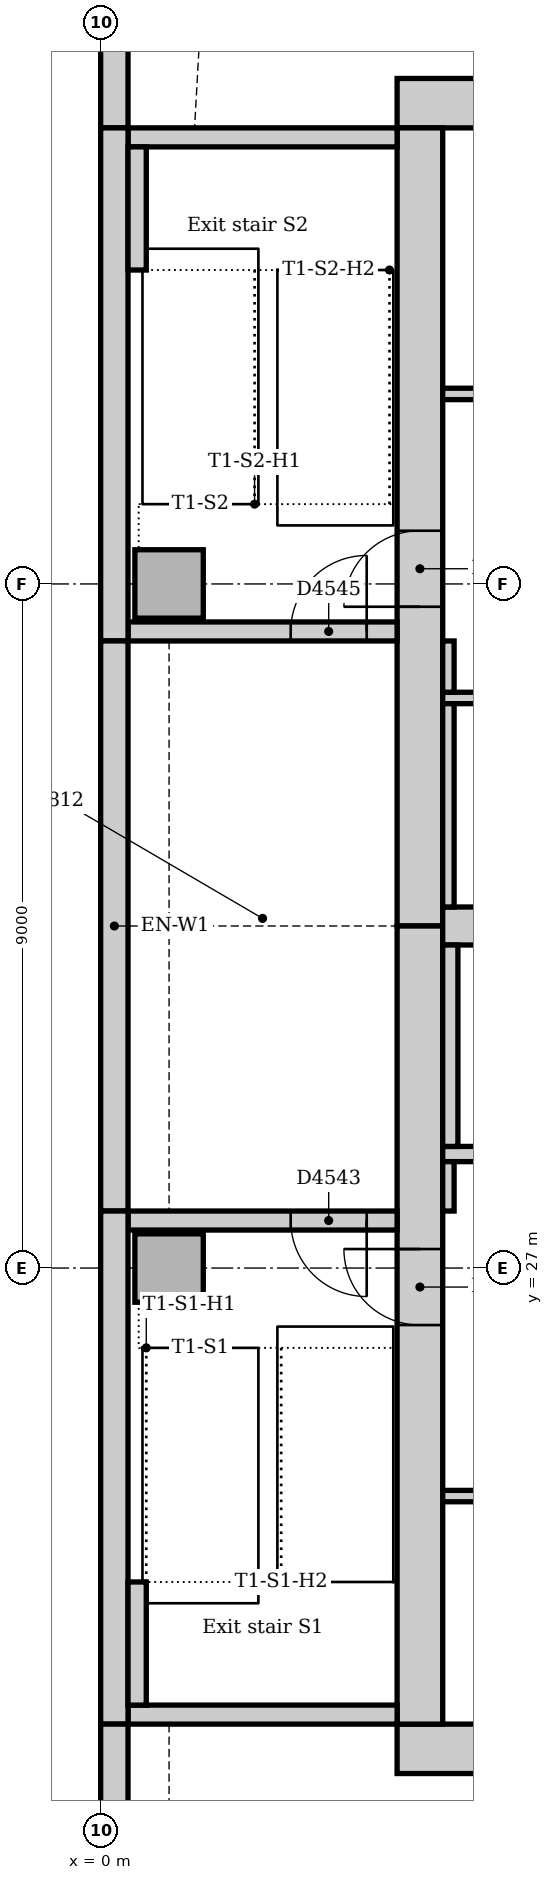
"""IFC4 building model, lengths in metres.
Left out: names, types, materials, properties, quantities, classifications, styles, units other than length and angle.
Written with IfcOpenShell. Run it as: python <this file> out.ifc"""

import sys

from ifc_helpers import new_model, si_unit, direction, frame, frame_2d, origin, origin_2d, place, context, subcontext, project, spatial, rectangle, extrude, element, fill, save


model = new_model("IFC4")
c1 = context("Model", 3, precision=1e-05, world=origin(), true_north=direction((0.0, 1.0)))
c2 = subcontext(c1, "Body", "Model", "MODEL_VIEW")
j1 = project(units=[si_unit("LENGTHUNIT", "METRE"), si_unit("PLANEANGLEUNIT", "RADIAN")], contexts=[c1])
p1 = place(None, origin())
s1 = spatial("IfcSite", under=j1, at=p1, CompositionType="ELEMENT")
p2 = place(p1, origin())
s2 = spatial("IfcBuilding", under=s1, at=p2, CompositionType="ELEMENT")
p3 = place(p2, frame((0.0, 0.0, 161.0)))
s3 = spatial("IfcBuildingStorey", under=s2, at=p3, CompositionType="ELEMENT", Elevation=161.0)
for number, where, z_axis, x_axis in (
    (1, (3.9, 20.675, 0.0), (0.0, 0.0, 1.0), (1.0, 0.0, 0.0)),
    (2, (23.15, 42.325, 0.0), (0.0, 0.0, 1.0), (-1.0, 0.0, 0.0)),
):
    element("IfcWall", number, at=place(p3, frame(where, z_axis=z_axis, x_axis=x_axis)), inside=s3, PredefinedType="SOLIDWALL", context=c2, shape_type="SweptSolid", body=[
        extrude(rectangle(XDim=19.25, YDim=0.65, at=frame_2d((9.625, 0.0))), origin(), (0.0, 0.0, 1.0), 4.0),
    ])
p4 = place(p3, frame((4.2, 42.0, 0.0), z_axis=(0.0, 0.0, 1.0), x_axis=(0.0, -1.0, 0.0)))
e3 = element("IfcWall", 3, at=p4, inside=s3, PredefinedType="SOLIDWALL", context=c2, shape_type="SweptSolid", body=[
    extrude(rectangle(XDim=10.5, YDim=0.6, at=frame_2d((5.25, 0.0))), origin(), (0.0, 0.0, 1.0), 4.0),
])
p5 = place(p4, frame((5.3, 0.0, 0.0)))
e4 = element("IfcOpeningElement", 4, at=p5, cuts=e3, PredefinedType="OPENING", context=c2, shape_type="SweptSolid", body=[
    extrude(rectangle(XDim=1.0, YDim=2.1, at=frame_2d((0.5, 1.05))), frame((0.0, 0.31, 0.0), z_axis=(0.0, -1.0, 0.0), x_axis=(1.0, 0.0, 0.0)), (0.0, 0.0, 1.0), 0.62),
])
p6 = place(p3, frame((4.2, 31.5, 0.0), z_axis=(0.0, 0.0, 1.0), x_axis=(0.0, -1.0, 0.0)))
e5 = element("IfcWall", 5, at=p6, inside=s3, PredefinedType="SOLIDWALL", context=c2, shape_type="SweptSolid", body=[
    extrude(rectangle(XDim=10.5, YDim=0.6, at=frame_2d((5.25, 0.0))), origin(), (0.0, 0.0, 1.0), 4.0),
])
p7 = place(p6, frame((4.25, 0.0, 0.0)))
e6 = element("IfcOpeningElement", 6, at=p7, cuts=e5, PredefinedType="OPENING", context=c2, shape_type="SweptSolid", body=[
    extrude(rectangle(XDim=1.0, YDim=2.1, at=frame_2d((0.5, 1.05))), frame((0.0, 0.31, 0.0), z_axis=(0.0, -1.0, 0.0), x_axis=(1.0, 0.0, 0.0)), (0.0, 0.0, 1.0), 0.62),
])
p8 = place(p3, frame((4.5, 31.5, 0.0), z_axis=(0.0, 0.0, 1.0), x_axis=(1.0, 0.0, 0.0)))
e7 = element("IfcWall", 7, at=p8, inside=s3, PredefinedType="SOLIDWALL", context=c2, shape_type="SweptSolid", body=[
    extrude(rectangle(XDim=18.0, YDim=0.5, at=frame_2d((9.0, 0.0))), origin(), (0.0, 0.0, 1.0), 4.0),
])
p9 = place(p3, frame((0.36, 21.125, 0.0), z_axis=(0.0, 0.0, 1.0), x_axis=(1.0, 0.0, 0.0)))
e8 = element("IfcWall", 8, at=p9, inside=s3, PredefinedType="SOLIDWALL", context=c2, shape_type="SweptSolid", body=[
    extrude(rectangle(XDim=3.54, YDim=0.25, at=frame_2d((1.77, 0.0))), origin(), (0.0, 0.0, 1.0), 4.0),
])
p10 = place(p3, frame((3.9, 27.625, 0.0), z_axis=(0.0, 0.0, 1.0), x_axis=(-1.0, 0.0, 0.0)))
e9 = element("IfcWall", 9, at=p10, inside=s3, PredefinedType="SOLIDWALL", context=c2, shape_type="SweptSolid", body=[
    extrude(rectangle(XDim=3.54, YDim=0.25, at=frame_2d((1.77, 0.0))), origin(), (0.0, 0.0, 1.0), 4.0),
])
p11 = place(p10, frame((0.4, 0.0, 0.0)))
e10 = element("IfcOpeningElement", 10, at=p11, cuts=e9, PredefinedType="OPENING", context=c2, shape_type="SweptSolid", body=[
    extrude(rectangle(XDim=1.0, YDim=2.1, at=frame_2d((0.5, 1.05))), frame((0.0, 0.135, 0.0), z_axis=(0.0, -1.0, 0.0), x_axis=(1.0, 0.0, 0.0)), (0.0, 0.0, 1.0), 0.27),
])
p12 = place(p3, frame((0.36, 35.375, 0.0), z_axis=(0.0, 0.0, 1.0), x_axis=(1.0, 0.0, 0.0)))
e11 = element("IfcWall", 11, at=p12, inside=s3, PredefinedType="SOLIDWALL", context=c2, shape_type="SweptSolid", body=[
    extrude(rectangle(XDim=3.54, YDim=0.25, at=frame_2d((1.77, 0.0))), origin(), (0.0, 0.0, 1.0), 4.0),
])
p13 = place(p12, frame((2.14, 0.0, 0.0)))
e12 = element("IfcOpeningElement", 12, at=p13, cuts=e11, PredefinedType="OPENING", context=c2, shape_type="SweptSolid", body=[
    extrude(rectangle(XDim=1.0, YDim=2.1, at=frame_2d((0.5, 1.05))), frame((0.0, 0.135, 0.0), z_axis=(0.0, -1.0, 0.0), x_axis=(1.0, 0.0, 0.0)), (0.0, 0.0, 1.0), 0.27),
])
p14 = place(p3, frame((3.9, 41.875, 0.0), z_axis=(0.0, 0.0, 1.0), x_axis=(-1.0, 0.0, 0.0)))
e13 = element("IfcWall", 13, at=p14, inside=s3, PredefinedType="SOLIDWALL", context=c2, shape_type="SweptSolid", body=[
    extrude(rectangle(XDim=3.54, YDim=0.25, at=frame_2d((1.77, 0.0))), origin(), (0.0, 0.0, 1.0), 4.0),
])
for number, where, z_axis, x_axis in (
    (14, (0.9, 27.0, 0.0), (0.0, 0.0, 1.0), (1.0, 0.0, 0.0)),
    (15, (0.9, 36.0, 0.0), (0.0, 0.0, 1.0), (1.0, 0.0, 0.0)),
):
    element("IfcColumn", number, at=place(p3, frame(where, z_axis=z_axis, x_axis=x_axis)), inside=s3, PredefinedType="COLUMN", context=c2, shape_type="SweptSolid", body=[
        extrude(rectangle(XDim=0.9, YDim=0.9, at=origin_2d()), origin(), (0.0, 0.0, 1.0), 4.0),
    ])
p15 = place(p3, frame((0.18, 49.757, 0.0), z_axis=(0.0, 0.0, 1.0), x_axis=(0.0, -1.0, 0.0)))
e16 = element("IfcWall", 16, at=p15, inside=s3, PredefinedType="STANDARD", context=c2, shape_type="SweptSolid", body=[
    extrude(rectangle(XDim=7.757, YDim=0.36, at=frame_2d((3.879, 0.0))), origin(), (0.0, 0.0, 1.0), 3.85),
])
p16 = place(p15, frame((3.107, 0.0, 0.9)))
e17 = element("IfcOpeningElement", 17, at=p16, cuts=e16, PredefinedType="OPENING", context=c2, shape_type="SweptSolid", body=[
    extrude(rectangle(XDim=3.3, YDim=1.6, at=frame_2d((1.65, 0.8))), frame((0.0, 0.19, 0.0), z_axis=(0.0, -1.0, 0.0), x_axis=(1.0, 0.0, 0.0)), (0.0, 0.0, 1.0), 0.38),
])
p17 = place(p3, frame((0.18, 42.0, 0.0), z_axis=(0.0, 0.0, 1.0), x_axis=(0.0, -1.0, 0.0)))
e18 = element("IfcWall", 18, at=p17, inside=s3, PredefinedType="STANDARD", context=c2, shape_type="SweptSolid", body=[
    extrude(rectangle(XDim=6.75, YDim=0.36, at=frame_2d((3.375, 0.0))), origin(), (0.0, 0.0, 1.0), 3.85),
])
p18 = place(p3, frame((0.18, 35.25, 0.0), z_axis=(0.0, 0.0, 1.0), x_axis=(0.0, -1.0, 0.0)))
e19 = element("IfcWall", 19, at=p18, inside=s3, PredefinedType="STANDARD", context=c2, shape_type="SweptSolid", body=[
    extrude(rectangle(XDim=7.5, YDim=0.36, at=frame_2d((3.75, 0.0))), origin(), (0.0, 0.0, 1.0), 3.85),
])
p19 = place(p3, frame((0.18, 27.75, 0.0), z_axis=(0.0, 0.0, 1.0), x_axis=(0.0, -1.0, 0.0)))
e20 = element("IfcWall", 20, at=p19, inside=s3, PredefinedType="STANDARD", context=c2, shape_type="SweptSolid", body=[
    extrude(rectangle(XDim=6.75, YDim=0.36, at=frame_2d((3.375, 0.0))), origin(), (0.0, 0.0, 1.0), 3.85),
])
p20 = place(p3, frame((0.18, 21.0, 0.0), z_axis=(0.0, 0.0, 1.0), x_axis=(0.0, -1.0, 0.0)))
e21 = element("IfcWall", 21, at=p20, inside=s3, PredefinedType="STANDARD", context=c2, shape_type="SweptSolid", body=[
    extrude(rectangle(XDim=7.757, YDim=0.36, at=frame_2d((3.879, 0.0))), origin(), (0.0, 0.0, 1.0), 3.85),
])
p21 = place(p20, frame((1.35, 0.0, 0.9)))
e22 = element("IfcOpeningElement", 22, at=p21, cuts=e21, PredefinedType="OPENING", context=c2, shape_type="SweptSolid", body=[
    extrude(rectangle(XDim=3.3, YDim=1.6, at=frame_2d((1.65, 0.8))), frame((0.0, 0.19, 0.0), z_axis=(0.0, -1.0, 0.0), x_axis=(1.0, 0.0, 0.0)), (0.0, 0.0, 1.0), 0.38),
])
for number, where, z_axis, x_axis in (
    (23, (0.48, 21.25, 0.0), (0.0, 0.0, 1.0), (0.0, 1.0, 0.0)),
    (24, (0.48, 40.13, 0.0), (0.0, 0.0, 1.0), (0.0, 1.0, 0.0)),
):
    element("IfcWall", number, at=place(p3, frame(where, z_axis=z_axis, x_axis=x_axis)), inside=s3, PredefinedType="STANDARD", context=c2, shape_type="SweptSolid", body=[
        extrude(rectangle(XDim=1.62, YDim=0.24, at=frame_2d((0.81, 0.0))), origin(), (0.0, 0.0, 1.0), 4.0),
    ])
p22 = place(p3, frame((4.5, 28.5, 0.0), z_axis=(0.0, 0.0, 1.0), x_axis=(1.0, 0.0, 0.0)))
e25 = element("IfcWall", 25, at=p22, inside=s3, PredefinedType="PARTITIONING", context=c2, shape_type="SweptSolid", body=[
    extrude(rectangle(XDim=18.0, YDim=0.2, at=frame_2d((9.0, 0.0))), origin(), (0.0, 0.0, 1.0), 3.85),
])
p23 = place(p22, frame((0.95, 0.0, 0.0)))
e26 = element("IfcOpeningElement", 26, at=p23, cuts=e25, PredefinedType="OPENING", context=c2, shape_type="SweptSolid", body=[
    extrude(rectangle(XDim=1.1, YDim=2.1, at=frame_2d((0.55, 1.05))), frame((0.0, 0.11, 0.0), z_axis=(0.0, -1.0, 0.0), x_axis=(1.0, 0.0, 0.0)), (0.0, 0.0, 1.0), 0.22),
])
p24 = place(p22, frame((3.95, 0.0, 0.0)))
e27 = element("IfcOpeningElement", 27, at=p24, cuts=e25, PredefinedType="OPENING", context=c2, shape_type="SweptSolid", body=[
    extrude(rectangle(XDim=1.1, YDim=2.1, at=frame_2d((0.55, 1.05))), frame((0.0, 0.11, 0.0), z_axis=(0.0, -1.0, 0.0), x_axis=(1.0, 0.0, 0.0)), (0.0, 0.0, 1.0), 0.22),
])
p25 = place(p22, frame((6.95, 0.0, 0.0)))
e28 = element("IfcOpeningElement", 28, at=p25, cuts=e25, PredefinedType="OPENING", context=c2, shape_type="SweptSolid", body=[
    extrude(rectangle(XDim=1.1, YDim=2.1, at=frame_2d((0.55, 1.05))), frame((0.0, 0.11, 0.0), z_axis=(0.0, -1.0, 0.0), x_axis=(1.0, 0.0, 0.0)), (0.0, 0.0, 1.0), 0.22),
])
p26 = place(p22, frame((9.95, 0.0, 0.0)))
e29 = element("IfcOpeningElement", 29, at=p26, cuts=e25, PredefinedType="OPENING", context=c2, shape_type="SweptSolid", body=[
    extrude(rectangle(XDim=1.1, YDim=2.1, at=frame_2d((0.55, 1.05))), frame((0.0, 0.11, 0.0), z_axis=(0.0, -1.0, 0.0), x_axis=(1.0, 0.0, 0.0)), (0.0, 0.0, 1.0), 0.22),
])
p27 = place(p22, frame((12.95, 0.0, 0.0)))
e30 = element("IfcOpeningElement", 30, at=p27, cuts=e25, PredefinedType="OPENING", context=c2, shape_type="SweptSolid", body=[
    extrude(rectangle(XDim=1.1, YDim=2.1, at=frame_2d((0.55, 1.05))), frame((0.0, 0.11, 0.0), z_axis=(0.0, -1.0, 0.0), x_axis=(1.0, 0.0, 0.0)), (0.0, 0.0, 1.0), 0.22),
])
p28 = place(p22, frame((15.95, 0.0, 0.0)))
e31 = element("IfcOpeningElement", 31, at=p28, cuts=e25, PredefinedType="OPENING", context=c2, shape_type="SweptSolid", body=[
    extrude(rectangle(XDim=1.1, YDim=2.1, at=frame_2d((0.55, 1.05))), frame((0.0, 0.11, 0.0), z_axis=(0.0, -1.0, 0.0), x_axis=(1.0, 0.0, 0.0)), (0.0, 0.0, 1.0), 0.22),
])
p29 = place(p3, frame((4.6, 28.6, 0.0), z_axis=(0.0, 0.0, 1.0), x_axis=(0.0, 1.0, 0.0)))
e32 = element("IfcWall", 32, at=p29, inside=s3, PredefinedType="PARTITIONING", context=c2, shape_type="SweptSolid", body=[
    extrude(rectangle(XDim=2.65, YDim=0.2, at=frame_2d((1.325, 0.0))), origin(), (0.0, 0.0, 1.0), 3.85),
])
p30 = place(p3, frame((4.5, 24.0, 0.0), z_axis=(0.0, 0.0, 1.0), x_axis=(1.0, 0.0, 0.0)))
e33 = element("IfcWall", 33, at=p30, inside=s3, PredefinedType="PARTITIONING", context=c2, shape_type="SweptSolid", body=[
    extrude(rectangle(XDim=18.0, YDim=0.15, at=frame_2d((9.0, 0.0))), origin(), (0.0, 0.0, 1.0), 3.85),
])
p31 = place(p30, frame((3.35, 0.0, 0.0)))
e34 = element("IfcOpeningElement", 34, at=p31, cuts=e33, PredefinedType="OPENING", context=c2, shape_type="SweptSolid", body=[
    extrude(rectangle(XDim=0.9, YDim=2.1, at=frame_2d((0.45, 1.05))), frame((0.0, 0.085, 0.0), z_axis=(0.0, -1.0, 0.0), x_axis=(1.0, 0.0, 0.0)), (0.0, 0.0, 1.0), 0.17),
])
p32 = place(p30, frame((8.55, 0.0, 0.0)))
e35 = element("IfcOpeningElement", 35, at=p32, cuts=e33, PredefinedType="OPENING", context=c2, shape_type="SweptSolid", body=[
    extrude(rectangle(XDim=0.9, YDim=2.1, at=frame_2d((0.45, 1.05))), frame((0.0, 0.085, 0.0), z_axis=(0.0, -1.0, 0.0), x_axis=(1.0, 0.0, 0.0)), (0.0, 0.0, 1.0), 0.17),
])
p33 = place(p30, frame((13.7, 0.0, 0.0)))
e36 = element("IfcOpeningElement", 36, at=p33, cuts=e33, PredefinedType="OPENING", context=c2, shape_type="SweptSolid", body=[
    extrude(rectangle(XDim=0.9, YDim=2.1, at=frame_2d((0.45, 1.05))), frame((0.0, 0.085, 0.0), z_axis=(0.0, -1.0, 0.0), x_axis=(1.0, 0.0, 0.0)), (0.0, 0.0, 1.0), 0.17),
])
p34 = place(p3, frame((4.5, 38.5, 0.0), z_axis=(0.0, 0.0, 1.0), x_axis=(1.0, 0.0, 0.0)))
e37 = element("IfcWall", 37, at=p34, inside=s3, PredefinedType="PARTITIONING", context=c2, shape_type="SweptSolid", body=[
    extrude(rectangle(XDim=11.9, YDim=0.15, at=frame_2d((5.95, 0.0))), origin(), (0.0, 0.0, 1.0), 3.85),
])
p35 = place(p34, frame((1.1, 0.0, 0.0)))
e38 = element("IfcOpeningElement", 38, at=p35, cuts=e37, PredefinedType="OPENING", context=c2, shape_type="SweptSolid", body=[
    extrude(rectangle(XDim=0.9, YDim=2.1, at=frame_2d((0.45, 1.05))), frame((0.0, 0.085, 0.0), z_axis=(0.0, -1.0, 0.0), x_axis=(1.0, 0.0, 0.0)), (0.0, 0.0, 1.0), 0.17),
])
p36 = place(p34, frame((4.05, 0.0, 0.0)))
e39 = element("IfcOpeningElement", 39, at=p36, cuts=e37, PredefinedType="OPENING", context=c2, shape_type="SweptSolid", body=[
    extrude(rectangle(XDim=0.9, YDim=2.1, at=frame_2d((0.45, 1.05))), frame((0.0, 0.085, 0.0), z_axis=(0.0, -1.0, 0.0), x_axis=(1.0, 0.0, 0.0)), (0.0, 0.0, 1.0), 0.17),
])
p37 = place(p34, frame((7.05, 0.0, 0.0)))
e40 = element("IfcOpeningElement", 40, at=p37, cuts=e37, PredefinedType="OPENING", context=c2, shape_type="SweptSolid", body=[
    extrude(rectangle(XDim=0.9, YDim=2.1, at=frame_2d((0.45, 1.05))), frame((0.0, 0.085, 0.0), z_axis=(0.0, -1.0, 0.0), x_axis=(1.0, 0.0, 0.0)), (0.0, 0.0, 1.0), 0.17),
])
p38 = place(p34, frame((9.95, 0.0, 0.0)))
e41 = element("IfcOpeningElement", 41, at=p38, cuts=e37, PredefinedType="OPENING", context=c2, shape_type="SweptSolid", body=[
    extrude(rectangle(XDim=0.8, YDim=2.1, at=frame_2d((0.4, 1.05))), frame((0.0, 0.085, 0.0), z_axis=(0.0, -1.0, 0.0), x_axis=(1.0, 0.0, 0.0)), (0.0, 0.0, 1.0), 0.17),
])
p39 = place(p3, frame((4.5, 34.5, 0.0), z_axis=(0.0, 0.0, 1.0), x_axis=(1.0, 0.0, 0.0)))
e42 = element("IfcWall", 42, at=p39, inside=s3, PredefinedType="PARTITIONING", context=c2, shape_type="SweptSolid", body=[
    extrude(rectangle(XDim=5.9, YDim=0.15, at=frame_2d((2.95, 0.0))), origin(), (0.0, 0.0, 1.0), 3.85),
])
p40 = place(p39, frame((2.5, 0.0, 0.0)))
e43 = element("IfcOpeningElement", 43, at=p40, cuts=e42, PredefinedType="OPENING", context=c2, shape_type="SweptSolid", body=[
    extrude(rectangle(XDim=0.9, YDim=2.1, at=frame_2d((0.45, 1.05))), frame((0.0, 0.085, 0.0), z_axis=(0.0, -1.0, 0.0), x_axis=(1.0, 0.0, 0.0)), (0.0, 0.0, 1.0), 0.17),
])
p41 = place(p3, frame((4.575, 34.575, 0.0), z_axis=(0.0, 0.0, 1.0), x_axis=(0.0, 1.0, 0.0)))
e44 = element("IfcWall", 44, at=p41, inside=s3, PredefinedType="PARTITIONING", context=c2, shape_type="SweptSolid", body=[
    extrude(rectangle(XDim=0.675, YDim=0.15, at=frame_2d((0.338, 0.0))), origin(), (0.0, 0.0, 1.0), 3.85),
])
p42 = place(p3, frame((4.575, 31.75, 0.0), z_axis=(0.0, 0.0, 1.0), x_axis=(0.0, 1.0, 0.0)))
e45 = element("IfcWall", 45, at=p42, inside=s3, PredefinedType="PARTITIONING", context=c2, shape_type="SweptSolid", body=[
    extrude(rectangle(XDim=2.675, YDim=0.15, at=frame_2d((1.337, 0.0))), origin(), (0.0, 0.0, 1.0), 3.85),
])
p43 = place(p3, frame((4.575, 27.75, 0.0), z_axis=(0.0, 0.0, 1.0), x_axis=(0.0, 1.0, 0.0)))
e46 = element("IfcWall", 46, at=p43, inside=s3, PredefinedType="PARTITIONING", context=c2, shape_type="SweptSolid", body=[
    extrude(rectangle(XDim=0.65, YDim=0.15, at=frame_2d((0.325, 0.0))), origin(), (0.0, 0.0, 1.0), 3.85),
])
p44 = place(p7, frame((1.0, 0.0, 0.0), z_axis=(0.0, 0.0, 1.0), x_axis=(-1.0, 0.0, 0.0)))
e47 = element("IfcDoor", 47, at=p44, inside=s3, OperationType="SINGLE_SWING_RIGHT", PredefinedType="DOOR", context=c2, shape_type="SweptSolid", body=[
    extrude(rectangle(XDim=1.0, YDim=2.1, at=frame_2d((0.5, 1.05))), frame((0.0, 0.025, 0.0), z_axis=(0.0, -1.0, 0.0), x_axis=(1.0, 0.0, 0.0)), (0.0, 0.0, 1.0), 0.05),
])
fill(e6, e47)
p45 = place(p11, origin())
e48 = element("IfcDoor", 48, at=p45, inside=s3, OperationType="SINGLE_SWING_LEFT", PredefinedType="DOOR", context=c2, shape_type="SweptSolid", body=[
    extrude(rectangle(XDim=1.0, YDim=2.1, at=frame_2d((0.5, 1.05))), frame((0.0, 0.025, 0.0), z_axis=(0.0, -1.0, 0.0), x_axis=(1.0, 0.0, 0.0)), (0.0, 0.0, 1.0), 0.05),
])
fill(e10, e48)
p46 = place(p5, frame((1.0, 0.0, 0.0), z_axis=(0.0, 0.0, 1.0), x_axis=(-1.0, 0.0, 0.0)))
e49 = element("IfcDoor", 49, at=p46, inside=s3, OperationType="SINGLE_SWING_LEFT", PredefinedType="DOOR", context=c2, shape_type="SweptSolid", body=[
    extrude(rectangle(XDim=1.0, YDim=2.1, at=frame_2d((0.5, 1.05))), frame((0.0, 0.025, 0.0), z_axis=(0.0, -1.0, 0.0), x_axis=(1.0, 0.0, 0.0)), (0.0, 0.0, 1.0), 0.05),
])
fill(e4, e49)
p47 = place(p13, origin())
e50 = element("IfcDoor", 50, at=p47, inside=s3, OperationType="SINGLE_SWING_RIGHT", PredefinedType="DOOR", context=c2, shape_type="SweptSolid", body=[
    extrude(rectangle(XDim=1.0, YDim=2.1, at=frame_2d((0.5, 1.05))), frame((0.0, 0.025, 0.0), z_axis=(0.0, -1.0, 0.0), x_axis=(1.0, 0.0, 0.0)), (0.0, 0.0, 1.0), 0.05),
])
fill(e12, e50)
save(model, sys.argv[1])
